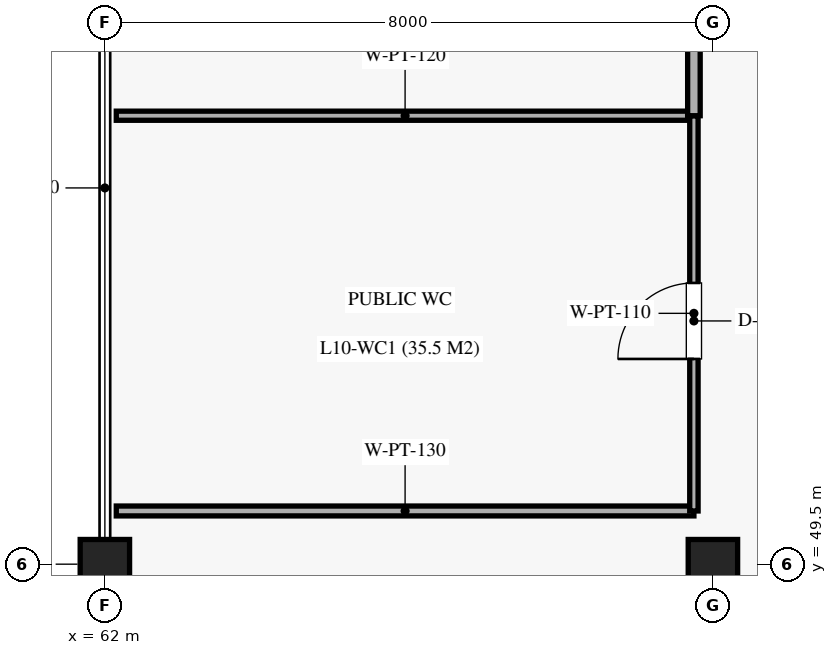
"""IFC4 building model, lengths in metres.
Left out: names, types, materials, properties, quantities, classifications, styles, units other than length and angle.
Written with IfcOpenShell. Run it as: python <this file> out.ifc"""

import sys

from ifc_helpers import new_model, si_unit, direction, frame, frame_2d, origin, origin_2d, place, context, subcontext, project, spatial, rectangle, extrude, element, fill, save


model = new_model("IFC4")
c1 = context("Model", 3, precision=1e-05, world=origin(), true_north=direction((0.0, 1.0)))
c2 = subcontext(c1, "Body", "Model", "MODEL_VIEW")
j1 = project(units=[si_unit("LENGTHUNIT", "METRE"), si_unit("PLANEANGLEUNIT", "RADIAN")], contexts=[c1])
p1 = place(None, origin())
s1 = spatial("IfcSite", under=j1, at=p1, CompositionType="ELEMENT")
p2 = place(p1, origin())
s2 = spatial("IfcBuilding", under=s1, at=p2, CompositionType="ELEMENT")
p3 = place(p2, frame((0.0, 0.0, 52.02)))
s3 = spatial("IfcBuildingStorey", under=s2, at=p3, CompositionType="ELEMENT", Elevation=52.02)
for number, where, z_axis, x_axis in (
    (1, (62.0, 49.5, 0.0), (0.0, 0.0, 1.0), (1.0, 0.0, 0.0)),
    (2, (70.0, 49.5, 0.0), (0.0, 0.0, 1.0), (1.0, 0.0, 0.0)),
):
    element("IfcColumn", number, at=place(p3, frame(where, z_axis=z_axis, x_axis=x_axis)), inside=s3, PredefinedType="COLUMN", context=c2, shape_type="SweptSolid", body=[
        extrude(rectangle(XDim=0.65, YDim=0.65, at=origin_2d()), origin(), (0.0, 0.0, 1.0), 5.1),
    ])
p4 = place(p3, frame((62.15, 50.2, 0.0), z_axis=(0.0, 0.0, 1.0), x_axis=(1.0, 0.0, 0.0)))
e3 = element("IfcWall", 3, at=p4, inside=s3, PredefinedType="PARTITIONING", context=c2, shape_type="SweptSolid", body=[
    extrude(rectangle(XDim=7.6, YDim=0.13, at=frame_2d((3.8, 0.0))), origin(), (0.0, 0.0, 1.0), 3.97),
])
p5 = place(p3, frame((62.15, 55.4, 0.0), z_axis=(0.0, 0.0, 1.0), x_axis=(1.0, 0.0, 0.0)))
e4 = element("IfcWall", 4, at=p5, inside=s3, PredefinedType="PARTITIONING", context=c2, shape_type="SweptSolid", body=[
    extrude(rectangle(XDim=7.6, YDim=0.12, at=frame_2d((3.8, 0.0))), origin(), (0.0, 0.0, 1.0), 3.97),
])
p6 = place(p3, frame((69.75, 50.2, 0.0), z_axis=(0.0, 0.0, 1.0), x_axis=(0.0, 1.0, 0.0)))
e5 = element("IfcWall", 5, at=p6, inside=s3, PredefinedType="PARTITIONING", context=c2, shape_type="SweptSolid", body=[
    extrude(rectangle(XDim=5.2, YDim=0.11, at=frame_2d((2.6, 0.0))), origin(), (0.0, 0.0, 1.0), 3.97),
])
p7 = place(p6, frame((2.0, 0.0, 0.0)))
e6 = element("IfcOpeningElement", 6, at=p7, cuts=e5, PredefinedType="OPENING", context=c2, shape_type="SweptSolid", body=[
    extrude(rectangle(XDim=1.0, YDim=2.1, at=frame_2d((0.5, 1.05))), frame((0.0, 0.065, 0.0), z_axis=(0.0, -1.0, 0.0), x_axis=(1.0, 0.0, 0.0)), (0.0, 0.0, 1.0), 0.13),
])
p8 = place(p3, frame((69.75, 55.4, 0.0), z_axis=(0.0, 0.0, 1.0), x_axis=(0.0, 1.0, 0.0)))
e7 = element("IfcWall", 7, at=p8, inside=s3, PredefinedType="PARTITIONING", context=c2, shape_type="SweptSolid", body=[
    extrude(rectangle(XDim=3.5, YDim=0.165, at=frame_2d((1.75, 0.0))), origin(), (0.0, 0.0, 1.0), 3.97),
])
p9 = place(p8, frame((1.15, 0.0, 0.0)))
e8 = element("IfcOpeningElement", 8, at=p9, cuts=e7, PredefinedType="OPENING", context=c2, shape_type="SweptSolid", body=[
    extrude(rectangle(XDim=1.05, YDim=2.15, at=frame_2d((0.525, 1.075))), frame((0.0, 0.093, 0.0), z_axis=(0.0, -1.0, 0.0), x_axis=(1.0, 0.0, 0.0)), (0.0, 0.0, 1.0), 0.185),
])
p10 = place(p7, origin())
e9 = element("IfcDoor", 9, at=p10, inside=s3, OperationType="SINGLE_SWING_LEFT", PredefinedType="DOOR", context=c2, shape_type="SweptSolid", body=[
    extrude(rectangle(XDim=1.0, YDim=2.1, at=frame_2d((0.5, 1.05))), frame((0.0, 0.025, 0.0), z_axis=(0.0, -1.0, 0.0), x_axis=(1.0, 0.0, 0.0)), (0.0, 0.0, 1.0), 0.05),
])
fill(e6, e9)
save(model, sys.argv[1])
